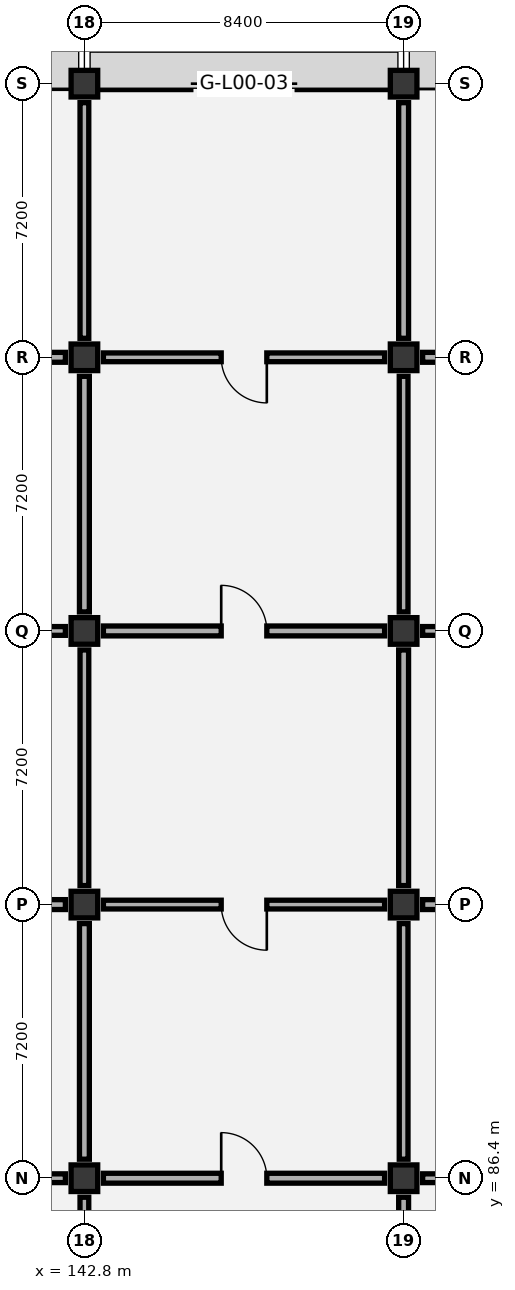
"""IFC4 building model, lengths in metres.
Left out: names, types, materials, properties, quantities, classifications, styles, units other than length and angle.
Written with IfcOpenShell. Run it as: python <this file> out.ifc"""

import sys

from ifc_helpers import new_model, si_unit, direction, frame, frame_2d, origin, origin_2d, place, context, subcontext, project, spatial, rectangle, extrude, element, fill, save


model = new_model("IFC4")
c1 = context("Model", 3, precision=1e-05, world=origin(), true_north=direction((0.0, 1.0)))
c2 = subcontext(c1, "Body", "Model", "MODEL_VIEW")
j1 = project(units=[si_unit("LENGTHUNIT", "METRE"), si_unit("PLANEANGLEUNIT", "RADIAN")], contexts=[c1])
p1 = place(None, origin())
s1 = spatial("IfcSite", under=j1, at=p1, CompositionType="ELEMENT")
p2 = place(p1, origin())
s2 = spatial("IfcBuilding", under=s1, at=p2, CompositionType="ELEMENT")
p3 = place(p2, origin())
s3 = spatial("IfcBuildingStorey", under=s2, at=p3, CompositionType="ELEMENT", Elevation=0.0)
for number, where, z_axis, x_axis in (
    (1, (142.8, 86.4, 0.0), (0.0, 0.0, 1.0), (1.0, 0.0, 0.0)),
    (2, (142.8, 93.6, 0.0), (0.0, 0.0, 1.0), (1.0, 0.0, 0.0)),
    (3, (142.8, 100.8, 0.0), (0.0, 0.0, 1.0), (1.0, 0.0, 0.0)),
    (4, (142.8, 108.0, 0.0), (0.0, 0.0, 1.0), (1.0, 0.0, 0.0)),
    (5, (142.8, 115.2, 0.0), (0.0, 0.0, 1.0), (1.0, 0.0, 0.0)),
    (6, (151.2, 86.4, 0.0), (0.0, 0.0, 1.0), (1.0, 0.0, 0.0)),
    (7, (151.2, 93.6, 0.0), (0.0, 0.0, 1.0), (1.0, 0.0, 0.0)),
    (8, (151.2, 100.8, 0.0), (0.0, 0.0, 1.0), (1.0, 0.0, 0.0)),
    (9, (151.2, 108.0, 0.0), (0.0, 0.0, 1.0), (1.0, 0.0, 0.0)),
    (10, (151.2, 115.2, 0.0), (0.0, 0.0, 1.0), (1.0, 0.0, 0.0)),
):
    element("IfcColumn", number, at=place(p3, frame(where, z_axis=z_axis, x_axis=x_axis)), inside=s3, PredefinedType="COLUMN", context=c2, shape_type="SweptSolid", body=[
        extrude(rectangle(XDim=0.7, YDim=0.7, at=origin_2d()), origin(), (0.0, 0.0, 1.0), 6.0),
    ])
p4 = place(p3, frame((134.75, 115.2, 0.0), z_axis=(0.0, 0.0, 1.0), x_axis=(1.0, 0.0, 0.0)))
e11 = element("IfcWall", 11, at=p4, inside=s3, PredefinedType="SOLIDWALL", context=c2, shape_type="SweptSolid", body=[
    extrude(rectangle(XDim=7.7, YDim=0.25, at=frame_2d((3.85, 0.0))), origin(), (0.0, 0.0, 1.0), 5.12),
])
p5 = place(p4, frame((2.25, 0.0, 0.0)))
e12 = element("IfcOpeningElement", 12, at=p5, cuts=e11, PredefinedType="OPENING", context=c2, shape_type="SweptSolid", body=[
    extrude(rectangle(XDim=3.2, YDim=3.2, at=frame_2d((1.6, 1.6))), frame((0.0, 0.135, 0.0), z_axis=(0.0, -1.0, 0.0), x_axis=(1.0, 0.0, 0.0)), (0.0, 0.0, 1.0), 0.27),
])
p6 = place(p3, frame((143.15, 115.2, 0.0), z_axis=(0.0, 0.0, 1.0), x_axis=(1.0, 0.0, 0.0)))
e13 = element("IfcWall", 13, at=p6, inside=s3, PredefinedType="SOLIDWALL", context=c2, shape_type="SweptSolid", body=[
    extrude(rectangle(XDim=7.7, YDim=0.31, at=frame_2d((3.85, 0.0))), origin(), (0.0, 0.0, 1.0), 5.12),
])
p7 = place(p6, frame((2.45, 0.0, 0.0)))
e14 = element("IfcOpeningElement", 14, at=p7, cuts=e13, PredefinedType="OPENING", context=c2, shape_type="SweptSolid", body=[
    extrude(rectangle(XDim=2.8, YDim=3.0, at=frame_2d((1.4, 1.5))), frame((0.0, 0.165, 0.0), z_axis=(0.0, -1.0, 0.0), x_axis=(1.0, 0.0, 0.0)), (0.0, 0.0, 1.0), 0.33),
])
p8 = place(p3, frame((151.55, 115.2, 0.0), z_axis=(0.0, 0.0, 1.0), x_axis=(1.0, 0.0, 0.0)))
e15 = element("IfcWall", 15, at=p8, inside=s3, PredefinedType="SOLIDWALL", context=c2, shape_type="SweptSolid", body=[
    extrude(rectangle(XDim=7.7, YDim=0.215, at=frame_2d((3.85, 0.0))), origin(), (0.0, 0.0, 1.0), 5.12),
])
p9 = place(p8, frame((2.15, 0.0, 0.0)))
e16 = element("IfcOpeningElement", 16, at=p9, cuts=e15, PredefinedType="OPENING", context=c2, shape_type="SweptSolid", body=[
    extrude(rectangle(XDim=3.4, YDim=3.4, at=frame_2d((1.7, 1.7))), frame((0.0, 0.117, 0.0), z_axis=(0.0, -1.0, 0.0), x_axis=(1.0, 0.0, 0.0)), (0.0, 0.0, 1.0), 0.235),
])
p10 = place(p3, frame((142.8, 79.7, 0.0), z_axis=(0.0, 0.0, 1.0), x_axis=(0.0, 1.0, 0.0)))
e17 = element("IfcWall", 17, at=p10, inside=s3, PredefinedType="PARTITIONING", context=c2, shape_type="SweptSolid", body=[
    extrude(rectangle(XDim=6.2, YDim=0.23, at=frame_2d((3.1, 0.0))), origin(), (0.0, 0.0, 1.0), 5.17),
])
p11 = place(p10, frame((2.5, 0.0, 0.0)))
e18 = element("IfcOpeningElement", 18, at=p11, cuts=e17, PredefinedType="OPENING", context=c2, shape_type="SweptSolid", body=[
    extrude(rectangle(XDim=1.2, YDim=2.1, at=frame_2d((0.6, 1.05))), frame((0.0, 0.125, 0.0), z_axis=(0.0, -1.0, 0.0), x_axis=(1.0, 0.0, 0.0)), (0.0, 0.0, 1.0), 0.25),
])
p12 = place(p3, frame((134.9, 86.4, 0.0), z_axis=(0.0, 0.0, 1.0), x_axis=(1.0, 0.0, 0.0)))
e19 = element("IfcWall", 19, at=p12, inside=s3, PredefinedType="PARTITIONING", context=c2, shape_type="SweptSolid", body=[
    extrude(rectangle(XDim=7.4, YDim=0.23, at=frame_2d((3.7, 0.0))), origin(), (0.0, 0.0, 1.0), 4.87),
])
p13 = place(p12, frame((3.1, 0.0, 0.0)))
e20 = element("IfcOpeningElement", 20, at=p13, cuts=e19, PredefinedType="OPENING", context=c2, shape_type="SweptSolid", body=[
    extrude(rectangle(XDim=1.2, YDim=2.1, at=frame_2d((0.6, 1.05))), frame((0.0, 0.125, 0.0), z_axis=(0.0, -1.0, 0.0), x_axis=(1.0, 0.0, 0.0)), (0.0, 0.0, 1.0), 0.25),
])
p14 = place(p3, frame((142.8, 86.9, 0.0), z_axis=(0.0, 0.0, 1.0), x_axis=(0.0, 1.0, 0.0)))
e21 = element("IfcWall", 21, at=p14, inside=s3, PredefinedType="PARTITIONING", context=c2, shape_type="SweptSolid", body=[
    extrude(rectangle(XDim=6.2, YDim=0.26, at=frame_2d((3.1, 0.0))), origin(), (0.0, 0.0, 1.0), 4.92),
])
p15 = place(p3, frame((134.9, 93.6, 0.0), z_axis=(0.0, 0.0, 1.0), x_axis=(1.0, 0.0, 0.0)))
e22 = element("IfcWall", 22, at=p15, inside=s3, PredefinedType="PARTITIONING", context=c2, shape_type="SweptSolid", body=[
    extrude(rectangle(XDim=7.4, YDim=0.26, at=frame_2d((3.7, 0.0))), origin(), (0.0, 0.0, 1.0), 4.87),
])
p16 = place(p15, frame((3.1, 0.0, 0.0)))
e23 = element("IfcOpeningElement", 23, at=p16, cuts=e22, PredefinedType="OPENING", context=c2, shape_type="SweptSolid", body=[
    extrude(rectangle(XDim=1.2, YDim=2.1, at=frame_2d((0.6, 1.05))), frame((0.0, 0.14, 0.0), z_axis=(0.0, -1.0, 0.0), x_axis=(1.0, 0.0, 0.0)), (0.0, 0.0, 1.0), 0.28),
])
p17 = place(p3, frame((142.8, 94.1, 0.0), z_axis=(0.0, 0.0, 1.0), x_axis=(0.0, 1.0, 0.0)))
e24 = element("IfcWall", 24, at=p17, inside=s3, PredefinedType="PARTITIONING", context=c2, shape_type="SweptSolid", body=[
    extrude(rectangle(XDim=6.2, YDim=0.23, at=frame_2d((3.1, 0.0))), origin(), (0.0, 0.0, 1.0), 5.37),
])
p18 = place(p3, frame((134.9, 100.8, 0.0), z_axis=(0.0, 0.0, 1.0), x_axis=(1.0, 0.0, 0.0)))
e25 = element("IfcWall", 25, at=p18, inside=s3, PredefinedType="PARTITIONING", context=c2, shape_type="SweptSolid", body=[
    extrude(rectangle(XDim=7.4, YDim=0.23, at=frame_2d((3.7, 0.0))), origin(), (0.0, 0.0, 1.0), 4.97),
])
p19 = place(p18, frame((3.1, 0.0, 0.0)))
e26 = element("IfcOpeningElement", 26, at=p19, cuts=e25, PredefinedType="OPENING", context=c2, shape_type="SweptSolid", body=[
    extrude(rectangle(XDim=1.2, YDim=2.1, at=frame_2d((0.6, 1.05))), frame((0.0, 0.125, 0.0), z_axis=(0.0, -1.0, 0.0), x_axis=(1.0, 0.0, 0.0)), (0.0, 0.0, 1.0), 0.25),
])
p20 = place(p3, frame((142.8, 101.3, 0.0), z_axis=(0.0, 0.0, 1.0), x_axis=(0.0, 1.0, 0.0)))
e27 = element("IfcWall", 27, at=p20, inside=s3, PredefinedType="PARTITIONING", context=c2, shape_type="SweptSolid", body=[
    extrude(rectangle(XDim=6.2, YDim=0.26, at=frame_2d((3.1, 0.0))), origin(), (0.0, 0.0, 1.0), 5.02),
])
p21 = place(p3, frame((134.9, 108.0, 0.0), z_axis=(0.0, 0.0, 1.0), x_axis=(1.0, 0.0, 0.0)))
e28 = element("IfcWall", 28, at=p21, inside=s3, PredefinedType="PARTITIONING", context=c2, shape_type="SweptSolid", body=[
    extrude(rectangle(XDim=7.4, YDim=0.26, at=frame_2d((3.7, 0.0))), origin(), (0.0, 0.0, 1.0), 4.97),
])
p22 = place(p21, frame((3.1, 0.0, 0.0)))
e29 = element("IfcOpeningElement", 29, at=p22, cuts=e28, PredefinedType="OPENING", context=c2, shape_type="SweptSolid", body=[
    extrude(rectangle(XDim=1.2, YDim=2.1, at=frame_2d((0.6, 1.05))), frame((0.0, 0.14, 0.0), z_axis=(0.0, -1.0, 0.0), x_axis=(1.0, 0.0, 0.0)), (0.0, 0.0, 1.0), 0.28),
])
p23 = place(p3, frame((142.8, 108.5, 0.0), z_axis=(0.0, 0.0, 1.0), x_axis=(0.0, 1.0, 0.0)))
e30 = element("IfcWall", 30, at=p23, inside=s3, PredefinedType="PARTITIONING", context=c2, shape_type="SweptSolid", body=[
    extrude(rectangle(XDim=6.2, YDim=0.23, at=frame_2d((3.1, 0.0))), origin(), (0.0, 0.0, 1.0), 5.48),
])
p24 = place(p3, frame((151.2, 79.7, 0.0), z_axis=(0.0, 0.0, 1.0), x_axis=(0.0, 1.0, 0.0)))
e31 = element("IfcWall", 31, at=p24, inside=s3, PredefinedType="PARTITIONING", context=c2, shape_type="SweptSolid", body=[
    extrude(rectangle(XDim=6.2, YDim=0.26, at=frame_2d((3.1, 0.0))), origin(), (0.0, 0.0, 1.0), 4.92),
])
p25 = place(p24, frame((2.5, 0.0, 0.0)))
e32 = element("IfcOpeningElement", 32, at=p25, cuts=e31, PredefinedType="OPENING", context=c2, shape_type="SweptSolid", body=[
    extrude(rectangle(XDim=1.2, YDim=2.1, at=frame_2d((0.6, 1.05))), frame((0.0, 0.14, 0.0), z_axis=(0.0, -1.0, 0.0), x_axis=(1.0, 0.0, 0.0)), (0.0, 0.0, 1.0), 0.28),
])
p26 = place(p3, frame((143.3, 86.4, 0.0), z_axis=(0.0, 0.0, 1.0), x_axis=(1.0, 0.0, 0.0)))
e33 = element("IfcWall", 33, at=p26, inside=s3, PredefinedType="PARTITIONING", context=c2, shape_type="SweptSolid", body=[
    extrude(rectangle(XDim=7.4, YDim=0.26, at=frame_2d((3.7, 0.0))), origin(), (0.0, 0.0, 1.0), 4.87),
])
p27 = place(p26, frame((3.1, 0.0, 0.0)))
e34 = element("IfcOpeningElement", 34, at=p27, cuts=e33, PredefinedType="OPENING", context=c2, shape_type="SweptSolid", body=[
    extrude(rectangle(XDim=1.2, YDim=2.1, at=frame_2d((0.6, 1.05))), frame((0.0, 0.14, 0.0), z_axis=(0.0, -1.0, 0.0), x_axis=(1.0, 0.0, 0.0)), (0.0, 0.0, 1.0), 0.28),
])
p28 = place(p3, frame((151.2, 86.9, 0.0), z_axis=(0.0, 0.0, 1.0), x_axis=(0.0, 1.0, 0.0)))
e35 = element("IfcWall", 35, at=p28, inside=s3, PredefinedType="PARTITIONING", context=c2, shape_type="SweptSolid", body=[
    extrude(rectangle(XDim=6.2, YDim=0.23, at=frame_2d((3.1, 0.0))), origin(), (0.0, 0.0, 1.0), 5.27),
])
p29 = place(p3, frame((143.3, 93.6, 0.0), z_axis=(0.0, 0.0, 1.0), x_axis=(1.0, 0.0, 0.0)))
e36 = element("IfcWall", 36, at=p29, inside=s3, PredefinedType="PARTITIONING", context=c2, shape_type="SweptSolid", body=[
    extrude(rectangle(XDim=7.4, YDim=0.23, at=frame_2d((3.7, 0.0))), origin(), (0.0, 0.0, 1.0), 4.87),
])
p30 = place(p29, frame((3.1, 0.0, 0.0)))
e37 = element("IfcOpeningElement", 37, at=p30, cuts=e36, PredefinedType="OPENING", context=c2, shape_type="SweptSolid", body=[
    extrude(rectangle(XDim=1.2, YDim=2.1, at=frame_2d((0.6, 1.05))), frame((0.0, 0.125, 0.0), z_axis=(0.0, -1.0, 0.0), x_axis=(1.0, 0.0, 0.0)), (0.0, 0.0, 1.0), 0.25),
])
p31 = place(p3, frame((151.2, 94.1, 0.0), z_axis=(0.0, 0.0, 1.0), x_axis=(0.0, 1.0, 0.0)))
e38 = element("IfcWall", 38, at=p31, inside=s3, PredefinedType="PARTITIONING", context=c2, shape_type="SweptSolid", body=[
    extrude(rectangle(XDim=6.2, YDim=0.26, at=frame_2d((3.1, 0.0))), origin(), (0.0, 0.0, 1.0), 5.02),
])
p32 = place(p3, frame((143.3, 100.8, 0.0), z_axis=(0.0, 0.0, 1.0), x_axis=(1.0, 0.0, 0.0)))
e39 = element("IfcWall", 39, at=p32, inside=s3, PredefinedType="PARTITIONING", context=c2, shape_type="SweptSolid", body=[
    extrude(rectangle(XDim=7.4, YDim=0.26, at=frame_2d((3.7, 0.0))), origin(), (0.0, 0.0, 1.0), 4.97),
])
p33 = place(p32, frame((3.1, 0.0, 0.0)))
e40 = element("IfcOpeningElement", 40, at=p33, cuts=e39, PredefinedType="OPENING", context=c2, shape_type="SweptSolid", body=[
    extrude(rectangle(XDim=1.2, YDim=2.1, at=frame_2d((0.6, 1.05))), frame((0.0, 0.14, 0.0), z_axis=(0.0, -1.0, 0.0), x_axis=(1.0, 0.0, 0.0)), (0.0, 0.0, 1.0), 0.28),
])
p34 = place(p3, frame((151.2, 101.3, 0.0), z_axis=(0.0, 0.0, 1.0), x_axis=(0.0, 1.0, 0.0)))
e41 = element("IfcWall", 41, at=p34, inside=s3, PredefinedType="PARTITIONING", context=c2, shape_type="SweptSolid", body=[
    extrude(rectangle(XDim=6.2, YDim=0.23, at=frame_2d((3.1, 0.0))), origin(), (0.0, 0.0, 1.0), 5.48),
])
p35 = place(p3, frame((143.3, 108.0, 0.0), z_axis=(0.0, 0.0, 1.0), x_axis=(1.0, 0.0, 0.0)))
e42 = element("IfcWall", 42, at=p35, inside=s3, PredefinedType="PARTITIONING", context=c2, shape_type="SweptSolid", body=[
    extrude(rectangle(XDim=7.4, YDim=0.23, at=frame_2d((3.7, 0.0))), origin(), (0.0, 0.0, 1.0), 4.97),
])
p36 = place(p35, frame((3.1, 0.0, 0.0)))
e43 = element("IfcOpeningElement", 43, at=p36, cuts=e42, PredefinedType="OPENING", context=c2, shape_type="SweptSolid", body=[
    extrude(rectangle(XDim=1.2, YDim=2.1, at=frame_2d((0.6, 1.05))), frame((0.0, 0.125, 0.0), z_axis=(0.0, -1.0, 0.0), x_axis=(1.0, 0.0, 0.0)), (0.0, 0.0, 1.0), 0.25),
])
p37 = place(p3, frame((151.2, 108.5, 0.0), z_axis=(0.0, 0.0, 1.0), x_axis=(0.0, 1.0, 0.0)))
e44 = element("IfcWall", 44, at=p37, inside=s3, PredefinedType="PARTITIONING", context=c2, shape_type="SweptSolid", body=[
    extrude(rectangle(XDim=6.2, YDim=0.26, at=frame_2d((3.1, 0.0))), origin(), (0.0, 0.0, 1.0), 5.02),
])
p38 = place(p3, frame((151.7, 86.4, 0.0), z_axis=(0.0, 0.0, 1.0), x_axis=(1.0, 0.0, 0.0)))
e45 = element("IfcWall", 45, at=p38, inside=s3, PredefinedType="PARTITIONING", context=c2, shape_type="SweptSolid", body=[
    extrude(rectangle(XDim=7.4, YDim=0.23, at=frame_2d((3.7, 0.0))), origin(), (0.0, 0.0, 1.0), 4.87),
])
p39 = place(p38, frame((3.1, 0.0, 0.0)))
e46 = element("IfcOpeningElement", 46, at=p39, cuts=e45, PredefinedType="OPENING", context=c2, shape_type="SweptSolid", body=[
    extrude(rectangle(XDim=1.2, YDim=2.1, at=frame_2d((0.6, 1.05))), frame((0.0, 0.125, 0.0), z_axis=(0.0, -1.0, 0.0), x_axis=(1.0, 0.0, 0.0)), (0.0, 0.0, 1.0), 0.25),
])
p40 = place(p3, frame((151.7, 93.6, 0.0), z_axis=(0.0, 0.0, 1.0), x_axis=(1.0, 0.0, 0.0)))
e47 = element("IfcWall", 47, at=p40, inside=s3, PredefinedType="PARTITIONING", context=c2, shape_type="SweptSolid", body=[
    extrude(rectangle(XDim=7.4, YDim=0.26, at=frame_2d((3.7, 0.0))), origin(), (0.0, 0.0, 1.0), 4.87),
])
p41 = place(p40, frame((3.1, 0.0, 0.0)))
e48 = element("IfcOpeningElement", 48, at=p41, cuts=e47, PredefinedType="OPENING", context=c2, shape_type="SweptSolid", body=[
    extrude(rectangle(XDim=1.2, YDim=2.1, at=frame_2d((0.6, 1.05))), frame((0.0, 0.14, 0.0), z_axis=(0.0, -1.0, 0.0), x_axis=(1.0, 0.0, 0.0)), (0.0, 0.0, 1.0), 0.28),
])
p42 = place(p3, frame((151.7, 100.8, 0.0), z_axis=(0.0, 0.0, 1.0), x_axis=(1.0, 0.0, 0.0)))
e49 = element("IfcWall", 49, at=p42, inside=s3, PredefinedType="PARTITIONING", context=c2, shape_type="SweptSolid", body=[
    extrude(rectangle(XDim=7.4, YDim=0.23, at=frame_2d((3.7, 0.0))), origin(), (0.0, 0.0, 1.0), 4.97),
])
p43 = place(p42, frame((3.1, 0.0, 0.0)))
e50 = element("IfcOpeningElement", 50, at=p43, cuts=e49, PredefinedType="OPENING", context=c2, shape_type="SweptSolid", body=[
    extrude(rectangle(XDim=1.2, YDim=2.1, at=frame_2d((0.6, 1.05))), frame((0.0, 0.125, 0.0), z_axis=(0.0, -1.0, 0.0), x_axis=(1.0, 0.0, 0.0)), (0.0, 0.0, 1.0), 0.25),
])
p44 = place(p3, frame((151.7, 108.0, 0.0), z_axis=(0.0, 0.0, 1.0), x_axis=(1.0, 0.0, 0.0)))
e51 = element("IfcWall", 51, at=p44, inside=s3, PredefinedType="PARTITIONING", context=c2, shape_type="SweptSolid", body=[
    extrude(rectangle(XDim=7.4, YDim=0.26, at=frame_2d((3.7, 0.0))), origin(), (0.0, 0.0, 1.0), 4.97),
])
p45 = place(p44, frame((3.1, 0.0, 0.0)))
e52 = element("IfcOpeningElement", 52, at=p45, cuts=e51, PredefinedType="OPENING", context=c2, shape_type="SweptSolid", body=[
    extrude(rectangle(XDim=1.2, YDim=2.1, at=frame_2d((0.6, 1.05))), frame((0.0, 0.14, 0.0), z_axis=(0.0, -1.0, 0.0), x_axis=(1.0, 0.0, 0.0)), (0.0, 0.0, 1.0), 0.28),
])
p46 = place(p7, origin())
e53 = element("IfcDoor", 53, at=p46, inside=s3, OperationType="ROLLINGUP", PredefinedType="GATE", context=c2, shape_type="SweptSolid", body=[
    extrude(rectangle(XDim=2.8, YDim=3.0, at=frame_2d((1.4, 1.5))), frame((0.0, 0.025, 0.0), z_axis=(0.0, -1.0, 0.0), x_axis=(1.0, 0.0, 0.0)), (0.0, 0.0, 1.0), 0.05),
])
fill(e14, e53)
p47 = place(p27, origin())
e54 = element("IfcDoor", 54, at=p47, inside=s3, OperationType="SINGLE_SWING_LEFT", PredefinedType="DOOR", context=c2, shape_type="SweptSolid", body=[
    extrude(rectangle(XDim=1.2, YDim=2.1, at=frame_2d((0.6, 1.05))), frame((0.0, 0.025, 0.0), z_axis=(0.0, -1.0, 0.0), x_axis=(1.0, 0.0, 0.0)), (0.0, 0.0, 1.0), 0.05),
])
fill(e34, e54)
p48 = place(p30, frame((1.2, 0.0, 0.0), z_axis=(0.0, 0.0, 1.0), x_axis=(-1.0, 0.0, 0.0)))
e55 = element("IfcDoor", 55, at=p48, inside=s3, OperationType="SINGLE_SWING_LEFT", PredefinedType="DOOR", context=c2, shape_type="SweptSolid", body=[
    extrude(rectangle(XDim=1.2, YDim=2.1, at=frame_2d((0.6, 1.05))), frame((0.0, 0.025, 0.0), z_axis=(0.0, -1.0, 0.0), x_axis=(1.0, 0.0, 0.0)), (0.0, 0.0, 1.0), 0.05),
])
fill(e37, e55)
p49 = place(p33, origin())
e56 = element("IfcDoor", 56, at=p49, inside=s3, OperationType="SINGLE_SWING_LEFT", PredefinedType="DOOR", context=c2, shape_type="SweptSolid", body=[
    extrude(rectangle(XDim=1.2, YDim=2.1, at=frame_2d((0.6, 1.05))), frame((0.0, 0.025, 0.0), z_axis=(0.0, -1.0, 0.0), x_axis=(1.0, 0.0, 0.0)), (0.0, 0.0, 1.0), 0.05),
])
fill(e40, e56)
p50 = place(p36, frame((1.2, 0.0, 0.0), z_axis=(0.0, 0.0, 1.0), x_axis=(-1.0, 0.0, 0.0)))
e57 = element("IfcDoor", 57, at=p50, inside=s3, OperationType="SINGLE_SWING_LEFT", PredefinedType="DOOR", context=c2, shape_type="SweptSolid", body=[
    extrude(rectangle(XDim=1.2, YDim=2.1, at=frame_2d((0.6, 1.05))), frame((0.0, 0.025, 0.0), z_axis=(0.0, -1.0, 0.0), x_axis=(1.0, 0.0, 0.0)), (0.0, 0.0, 1.0), 0.05),
])
fill(e43, e57)
save(model, sys.argv[1])
